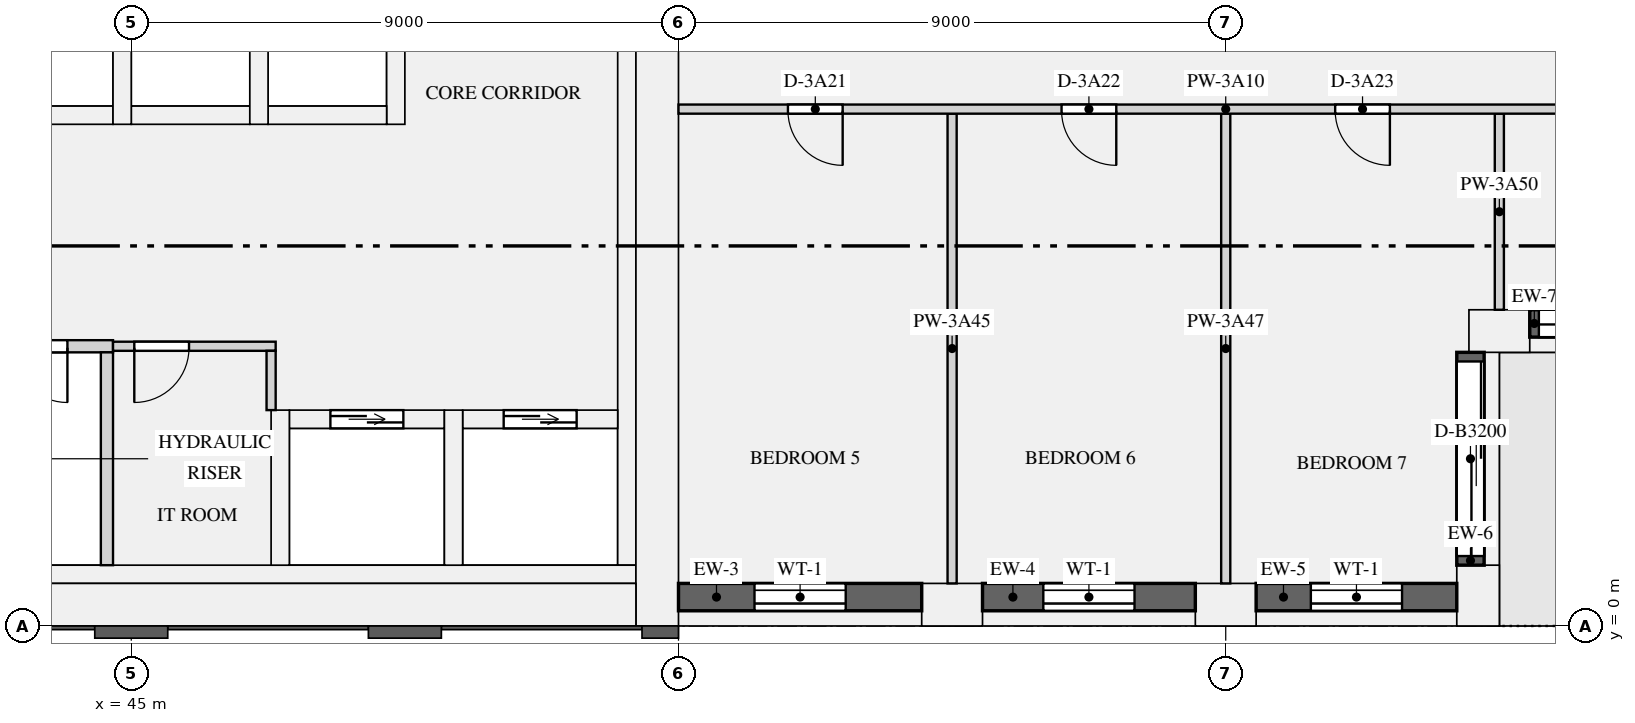
"""IFC4 building model, lengths in metres.
Left out: names, types, materials, properties, quantities, classifications, styles, units other than length and angle.
Written with IfcOpenShell. Run it as: python <this file> out.ifc"""

import sys

from ifc_helpers import new_model, si_unit, direction, frame, frame_2d, origin, origin_2d, place, context, subcontext, project, spatial, rectangle, extrude, element, fill, save


model = new_model("IFC4")
c1 = context("Model", 3, precision=1e-05, world=origin(), true_north=direction((0.0, 1.0)))
c2 = subcontext(c1, "Body", "Model", "MODEL_VIEW")
j1 = project(units=[si_unit("LENGTHUNIT", "METRE"), si_unit("PLANEANGLEUNIT", "RADIAN")], contexts=[c1])
p1 = place(None, origin())
s1 = spatial("IfcSite", under=j1, at=p1, CompositionType="ELEMENT")
p2 = place(p1, origin())
s2 = spatial("IfcBuilding", under=s1, at=p2, CompositionType="ELEMENT")
p3 = place(p2, frame((0.0, 0.0, 141.3)))
s3 = spatial("IfcBuildingStorey", under=s2, at=p3, CompositionType="ELEMENT", Elevation=141.3)
for number, where, z_axis, x_axis in (
    (1, (58.5, 0.35, 0.0), (0.0, 0.0, 1.0), (1.0, 0.0, 0.0)),
    (2, (63.0, 0.35, 0.0), (0.0, 0.0, 1.0), (1.0, 0.0, 0.0)),
    (3, (67.15, 0.5, 0.0), (0.0, 0.0, 1.0), (0.0, 1.0, 0.0)),
    (4, (67.5, 4.85, 0.0), (0.0, 0.0, 1.0), (1.0, 0.0, 0.0)),
):
    element("IfcColumn", number, at=place(p3, frame(where, z_axis=z_axis, x_axis=x_axis)), inside=s3, PredefinedType="USERDEFINED", context=c2, shape_type="SweptSolid", body=[
        extrude(rectangle(XDim=1.0, YDim=0.7, at=origin_2d()), origin(), (0.0, 0.0, 1.0), 3.15),
    ])
p4 = place(p3, frame((53.65, 0.0, 0.0), z_axis=(0.0, 0.0, 1.0), x_axis=(0.0, 1.0, 0.0)))
e5 = element("IfcWall", 5, at=p4, inside=s3, PredefinedType="SHEAR", context=c2, shape_type="SweptSolid", body=[
    extrude(rectangle(XDim=12.5, YDim=0.7, at=frame_2d((6.25, 0.0))), origin(), (0.0, 0.0, 1.0), 3.15),
])
p5 = place(p3, frame((18.7, 0.35, 0.0), z_axis=(0.0, 0.0, 1.0), x_axis=(1.0, 0.0, 0.0)))
e6 = element("IfcWall", 6, at=p5, inside=s3, PredefinedType="SHEAR", context=c2, shape_type="SweptSolid", body=[
    extrude(rectangle(XDim=34.6, YDim=0.7, at=frame_2d((17.3, 0.0))), origin(), (0.0, 0.0, 1.0), 3.15),
])
p6 = place(p3, frame((53.15, 1.0, 0.0), z_axis=(0.0, 0.0, 1.0), x_axis=(0.0, 1.0, 0.0)))
e7 = element("IfcWall", 7, at=p6, inside=s3, PredefinedType="SHEAR", context=c2, shape_type="SweptSolid", body=[
    extrude(rectangle(XDim=10.9, YDim=0.3, at=frame_2d((5.45, 0.0))), origin(), (0.0, 0.0, 1.0), 3.15),
])
p7 = place(p3, frame((18.7, 0.85, 0.0), z_axis=(0.0, 0.0, 1.0), x_axis=(1.0, 0.0, 0.0)))
e8 = element("IfcWall", 8, at=p7, inside=s3, PredefinedType="SHEAR", context=c2, shape_type="SweptSolid", body=[
    extrude(rectangle(XDim=34.6, YDim=0.3, at=frame_2d((17.3, 0.0))), origin(), (0.0, 0.0, 1.0), 3.15),
])
for number, where, z_axis, x_axis in (
    (9, (42.75, 8.4, 0.0), (0.0, 0.0, 1.0), (1.0, 0.0, 0.0)),
    (10, (45.0, 8.4, 0.0), (0.0, 0.0, 1.0), (1.0, 0.0, 0.0)),
):
    element("IfcWall", number, at=place(p3, frame(where, z_axis=z_axis, x_axis=x_axis)), inside=s3, PredefinedType="SHEAR", context=c2, shape_type="SweptSolid", body=[
        extrude(rectangle(XDim=1.95, YDim=0.3, at=frame_2d((0.975, 0.0))), origin(), (0.0, 0.0, 1.0), 3.15),
    ])
p8 = place(p3, frame((44.85, 8.25, 0.0), z_axis=(0.0, 0.0, 1.0), x_axis=(0.0, 1.0, 0.0)))
e11 = element("IfcWall", 11, at=p8, inside=s3, PredefinedType="SHEAR", context=c2, shape_type="SweptSolid", body=[
    extrude(rectangle(XDim=3.65, YDim=0.3, at=frame_2d((1.825, 0.0))), origin(), (0.0, 0.0, 1.0), 3.15),
])
p9 = place(p3, frame((47.25, 8.4, 0.0), z_axis=(0.0, 0.0, 1.0), x_axis=(1.0, 0.0, 0.0)))
e12 = element("IfcWall", 12, at=p9, inside=s3, PredefinedType="SHEAR", context=c2, shape_type="SweptSolid", body=[
    extrude(rectangle(XDim=1.95, YDim=0.3, at=frame_2d((0.975, 0.0))), origin(), (0.0, 0.0, 1.0), 3.15),
])
for number, where, z_axis, x_axis in (
    (13, (47.1, 8.25, 0.0), (0.0, 0.0, 1.0), (0.0, 1.0, 0.0)),
    (14, (49.35, 8.25, 0.0), (0.0, 0.0, 1.0), (0.0, 1.0, 0.0)),
):
    element("IfcWall", number, at=place(p3, frame(where, z_axis=z_axis, x_axis=x_axis)), inside=s3, PredefinedType="SHEAR", context=c2, shape_type="SweptSolid", body=[
        extrude(rectangle(XDim=3.65, YDim=0.3, at=frame_2d((1.825, 0.0))), origin(), (0.0, 0.0, 1.0), 3.15),
    ])
p10 = place(p3, frame((47.6, 3.4, 0.0), z_axis=(0.0, 0.0, 1.0), x_axis=(1.0, 0.0, 0.0)))
e15 = element("IfcWall", 15, at=p10, inside=s3, PredefinedType="SHEAR", context=c2, shape_type="SweptSolid", body=[
    extrude(rectangle(XDim=2.55, YDim=0.3, at=frame_2d((1.275, 0.0))), origin(), (0.0, 0.0, 1.0), 3.15),
])
p11 = place(p10, frame((0.675, 0.0, 0.0)))
e16 = element("IfcOpeningElement", 16, at=p11, cuts=e15, PredefinedType="OPENING", context=c2, shape_type="SweptSolid", body=[
    extrude(rectangle(XDim=1.2, YDim=2.1, at=frame_2d((0.6, 1.05))), frame((0.0, 0.16, 0.0), z_axis=(0.0, -1.0, 0.0), x_axis=(1.0, 0.0, 0.0)), (0.0, 0.0, 1.0), 0.32),
])
p12 = place(p3, frame((47.45, 1.0, 0.0), z_axis=(0.0, 0.0, 1.0), x_axis=(0.0, 1.0, 0.0)))
e17 = element("IfcWall", 17, at=p12, inside=s3, PredefinedType="SHEAR", context=c2, shape_type="SweptSolid", body=[
    extrude(rectangle(XDim=2.55, YDim=0.3, at=frame_2d((1.275, 0.0))), origin(), (0.0, 0.0, 1.0), 3.15),
])
p13 = place(p3, frame((50.45, 3.4, 0.0), z_axis=(0.0, 0.0, 1.0), x_axis=(1.0, 0.0, 0.0)))
e18 = element("IfcWall", 18, at=p13, inside=s3, PredefinedType="SHEAR", context=c2, shape_type="SweptSolid", body=[
    extrude(rectangle(XDim=2.55, YDim=0.3, at=frame_2d((1.275, 0.0))), origin(), (0.0, 0.0, 1.0), 3.15),
])
p14 = place(p13, frame((0.675, 0.0, 0.0)))
e19 = element("IfcOpeningElement", 19, at=p14, cuts=e18, PredefinedType="OPENING", context=c2, shape_type="SweptSolid", body=[
    extrude(rectangle(XDim=1.2, YDim=2.1, at=frame_2d((0.6, 1.05))), frame((0.0, 0.16, 0.0), z_axis=(0.0, -1.0, 0.0), x_axis=(1.0, 0.0, 0.0)), (0.0, 0.0, 1.0), 0.32),
])
p15 = place(p3, frame((50.3, 1.0, 0.0), z_axis=(0.0, 0.0, 1.0), x_axis=(0.0, 1.0, 0.0)))
e20 = element("IfcWall", 20, at=p15, inside=s3, PredefinedType="SHEAR", context=c2, shape_type="SweptSolid", body=[
    extrude(rectangle(XDim=2.55, YDim=0.3, at=frame_2d((1.275, 0.0))), origin(), (0.0, 0.0, 1.0), 3.15),
])
p16 = place(p3, frame((54.0, 0.475, 0.9), z_axis=(0.0, 0.0, 1.0), x_axis=(1.0, 0.0, 0.0)))
e21 = element("IfcWall", 21, at=p16, inside=s3, PredefinedType="SOLIDWALL", context=c2, shape_type="SweptSolid", body=[
    extrude(rectangle(XDim=4.0, YDim=0.45, at=frame_2d((2.0, 0.0))), origin(), (0.0, 0.0, 1.0), 1.93),
])
p17 = place(p16, frame((1.25, 0.0, 0.15)))
e22 = element("IfcOpeningElement", 22, at=p17, cuts=e21, PredefinedType="OPENING", context=c2, shape_type="SweptSolid", body=[
    extrude(rectangle(XDim=1.5, YDim=1.5, at=frame_2d((0.75, 0.75))), frame((0.0, 0.235, 0.0), z_axis=(0.0, -1.0, 0.0), x_axis=(1.0, 0.0, 0.0)), (0.0, 0.0, 1.0), 0.47),
])
p18 = place(p3, frame((59.0, 0.475, 0.9), z_axis=(0.0, 0.0, 1.0), x_axis=(1.0, 0.0, 0.0)))
e23 = element("IfcWall", 23, at=p18, inside=s3, PredefinedType="SOLIDWALL", context=c2, shape_type="SweptSolid", body=[
    extrude(rectangle(XDim=3.5, YDim=0.45, at=frame_2d((1.75, 0.0))), origin(), (0.0, 0.0, 1.0), 1.93),
])
p19 = place(p18, frame((1.0, 0.0, 0.15)))
e24 = element("IfcOpeningElement", 24, at=p19, cuts=e23, PredefinedType="OPENING", context=c2, shape_type="SweptSolid", body=[
    extrude(rectangle(XDim=1.5, YDim=1.5, at=frame_2d((0.75, 0.75))), frame((0.0, 0.235, 0.0), z_axis=(0.0, -1.0, 0.0), x_axis=(1.0, 0.0, 0.0)), (0.0, 0.0, 1.0), 0.47),
])
p20 = place(p3, frame((63.5, 0.475, 0.9), z_axis=(0.0, 0.0, 1.0), x_axis=(1.0, 0.0, 0.0)))
e25 = element("IfcWall", 25, at=p20, inside=s3, PredefinedType="SOLIDWALL", context=c2, shape_type="SweptSolid", body=[
    extrude(rectangle(XDim=3.3, YDim=0.45, at=frame_2d((1.65, 0.0))), origin(), (0.0, 0.0, 1.0), 1.93),
])
p21 = place(p20, frame((0.9, 0.0, 0.15)))
e26 = element("IfcOpeningElement", 26, at=p21, cuts=e25, PredefinedType="OPENING", context=c2, shape_type="SweptSolid", body=[
    extrude(rectangle(XDim=1.5, YDim=1.5, at=frame_2d((0.75, 0.75))), frame((0.0, 0.235, 0.0), z_axis=(0.0, -1.0, 0.0), x_axis=(1.0, 0.0, 0.0)), (0.0, 0.0, 1.0), 0.47),
])
p22 = place(p3, frame((67.025, 1.0, 0.0), z_axis=(0.0, 0.0, 1.0), x_axis=(0.0, 1.0, 0.0)))
e27 = element("IfcWall", 27, at=p22, inside=s3, PredefinedType="SOLIDWALL", context=c2, shape_type="SweptSolid", body=[
    extrude(rectangle(XDim=3.5, YDim=0.45, at=frame_2d((1.75, 0.0))), origin(), (0.0, 0.0, 1.0), 2.83),
])
p23 = place(p22, frame((0.15, 0.0, 0.0)))
e28 = element("IfcOpeningElement", 28, at=p23, cuts=e27, PredefinedType="OPENING", context=c2, shape_type="SweptSolid", body=[
    extrude(rectangle(XDim=3.2, YDim=2.3, at=frame_2d((1.6, 1.15))), frame((0.0, 0.235, 0.0), z_axis=(0.0, -1.0, 0.0), x_axis=(1.0, 0.0, 0.0)), (0.0, 0.0, 1.0), 0.47),
])
p24 = place(p3, frame((68.0, 4.975, 0.0), z_axis=(0.0, 0.0, 1.0), x_axis=(1.0, 0.0, 0.0)))
e29 = element("IfcWall", 29, at=p24, inside=s3, PredefinedType="SOLIDWALL", context=c2, shape_type="SweptSolid", body=[
    extrude(rectangle(XDim=3.3, YDim=0.45, at=frame_2d((1.65, 0.0))), origin(), (0.0, 0.0, 1.0), 2.83),
])
p25 = place(p24, frame((0.15, 0.0, 0.0)))
e30 = element("IfcOpeningElement", 30, at=p25, cuts=e29, PredefinedType="OPENING", context=c2, shape_type="SweptSolid", body=[
    extrude(rectangle(XDim=3.0, YDim=2.3, at=frame_2d((1.5, 1.15))), frame((0.0, 0.235, 0.0), z_axis=(0.0, -1.0, 0.0), x_axis=(1.0, 0.0, 0.0)), (0.0, 0.0, 1.0), 0.47),
])
p26 = place(p3, frame((40.2, 4.6, 0.0), z_axis=(0.0, 0.0, 1.0), x_axis=(1.0, 0.0, 0.0)))
e31 = element("IfcWall", 31, at=p26, inside=s3, PredefinedType="PARTITIONING", context=c2, shape_type="SweptSolid", body=[
    extrude(rectangle(XDim=4.5, YDim=0.2, at=frame_2d((2.25, 0.0))), origin(), (0.0, 0.0, 1.0), 2.83),
])
p27 = place(p26, frame((0.65, 0.0, 0.0)))
e32 = element("IfcOpeningElement", 32, at=p27, cuts=e31, PredefinedType="OPENING", context=c2, shape_type="SweptSolid", body=[
    extrude(rectangle(XDim=0.9, YDim=2.1, at=frame_2d((0.45, 1.05))), frame((0.0, 0.11, 0.0), z_axis=(0.0, -1.0, 0.0), x_axis=(1.0, 0.0, 0.0)), (0.0, 0.0, 1.0), 0.22),
])
p28 = place(p26, frame((2.85, 0.0, 0.0)))
e33 = element("IfcOpeningElement", 33, at=p28, cuts=e31, PredefinedType="OPENING", context=c2, shape_type="SweptSolid", body=[
    extrude(rectangle(XDim=0.9, YDim=2.1, at=frame_2d((0.45, 1.05))), frame((0.0, 0.11, 0.0), z_axis=(0.0, -1.0, 0.0), x_axis=(1.0, 0.0, 0.0)), (0.0, 0.0, 1.0), 0.22),
])
p29 = place(p3, frame((44.7, 4.6, 0.0), z_axis=(0.0, 0.0, 1.0), x_axis=(1.0, 0.0, 0.0)))
e34 = element("IfcWall", 34, at=p29, inside=s3, PredefinedType="PARTITIONING", context=c2, shape_type="SweptSolid", body=[
    extrude(rectangle(XDim=2.675, YDim=0.15, at=frame_2d((1.337, 0.0))), origin(), (0.0, 0.0, 1.0), 2.83),
])
p30 = place(p29, frame((0.35, 0.0, 0.0)))
e35 = element("IfcOpeningElement", 35, at=p30, cuts=e34, PredefinedType="OPENING", context=c2, shape_type="SweptSolid", body=[
    extrude(rectangle(XDim=0.9, YDim=2.1, at=frame_2d((0.45, 1.05))), frame((0.0, 0.085, 0.0), z_axis=(0.0, -1.0, 0.0), x_axis=(1.0, 0.0, 0.0)), (0.0, 0.0, 1.0), 0.17),
])
p31 = place(p3, frame((44.6, 1.0, 0.0), z_axis=(0.0, 0.0, 1.0), x_axis=(0.0, 1.0, 0.0)))
e36 = element("IfcWall", 36, at=p31, inside=s3, PredefinedType="PARTITIONING", context=c2, shape_type="SweptSolid", body=[
    extrude(rectangle(XDim=3.5, YDim=0.2, at=frame_2d((1.75, 0.0))), origin(), (0.0, 0.0, 1.0), 2.83),
])
p32 = place(p3, frame((47.3, 3.55, 0.0), z_axis=(0.0, 0.0, 1.0), x_axis=(0.0, 1.0, 0.0)))
e37 = element("IfcWall", 37, at=p32, inside=s3, PredefinedType="PARTITIONING", context=c2, shape_type="SweptSolid", body=[
    extrude(rectangle(XDim=0.975, YDim=0.15, at=frame_2d((0.487, 0.0))), origin(), (0.0, 0.0, 1.0), 2.83),
])
p33 = place(p3, frame((54.0, 8.5, 0.0), z_axis=(0.0, 0.0, 1.0), x_axis=(1.0, 0.0, 0.0)))
e38 = element("IfcWall", 38, at=p33, inside=s3, PredefinedType="PARTITIONING", context=c2, shape_type="SweptSolid", body=[
    extrude(rectangle(XDim=17.3, YDim=0.15, at=frame_2d((8.65, 0.0))), origin(), (0.0, 0.0, 1.0), 2.83),
])
p34 = place(p33, frame((1.8, 0.0, 0.0)))
e39 = element("IfcOpeningElement", 39, at=p34, cuts=e38, PredefinedType="OPENING", context=c2, shape_type="SweptSolid", body=[
    extrude(rectangle(XDim=0.9, YDim=2.1, at=frame_2d((0.45, 1.05))), frame((0.0, 0.085, 0.0), z_axis=(0.0, -1.0, 0.0), x_axis=(1.0, 0.0, 0.0)), (0.0, 0.0, 1.0), 0.17),
])
p35 = place(p33, frame((6.3, 0.0, 0.0)))
e40 = element("IfcOpeningElement", 40, at=p35, cuts=e38, PredefinedType="OPENING", context=c2, shape_type="SweptSolid", body=[
    extrude(rectangle(XDim=0.9, YDim=2.1, at=frame_2d((0.45, 1.05))), frame((0.0, 0.085, 0.0), z_axis=(0.0, -1.0, 0.0), x_axis=(1.0, 0.0, 0.0)), (0.0, 0.0, 1.0), 0.17),
])
p36 = place(p33, frame((10.8, 0.0, 0.0)))
e41 = element("IfcOpeningElement", 41, at=p36, cuts=e38, PredefinedType="OPENING", context=c2, shape_type="SweptSolid", body=[
    extrude(rectangle(XDim=0.9, YDim=2.1, at=frame_2d((0.45, 1.05))), frame((0.0, 0.085, 0.0), z_axis=(0.0, -1.0, 0.0), x_axis=(1.0, 0.0, 0.0)), (0.0, 0.0, 1.0), 0.17),
])
p37 = place(p33, frame((15.025, 0.0, 0.0)))
e42 = element("IfcOpeningElement", 42, at=p37, cuts=e38, PredefinedType="OPENING", context=c2, shape_type="SweptSolid", body=[
    extrude(rectangle(XDim=0.9, YDim=2.1, at=frame_2d((0.45, 1.05))), frame((0.0, 0.085, 0.0), z_axis=(0.0, -1.0, 0.0), x_axis=(1.0, 0.0, 0.0)), (0.0, 0.0, 1.0), 0.17),
])
for number, where, z_axis, x_axis in (
    (43, (58.5, 0.7, 0.0), (0.0, 0.0, 1.0), (0.0, 1.0, 0.0)),
    (44, (63.0, 0.7, 0.0), (0.0, 0.0, 1.0), (0.0, 1.0, 0.0)),
):
    element("IfcWall", number, at=place(p3, frame(where, z_axis=z_axis, x_axis=x_axis)), inside=s3, PredefinedType="PARTITIONING", context=c2, shape_type="SweptSolid", body=[
        extrude(rectangle(XDim=7.725, YDim=0.15, at=frame_2d((3.863, 0.0))), origin(), (0.0, 0.0, 1.0), 2.83),
    ])
p38 = place(p3, frame((67.5, 5.2, 0.0), z_axis=(0.0, 0.0, 1.0), x_axis=(0.0, 1.0, 0.0)))
e45 = element("IfcWall", 45, at=p38, inside=s3, PredefinedType="PARTITIONING", context=c2, shape_type="SweptSolid", body=[
    extrude(rectangle(XDim=3.225, YDim=0.15, at=frame_2d((1.613, 0.0))), origin(), (0.0, 0.0, 1.0), 2.83),
])
p39 = place(p17, origin())
e46 = element("IfcWindow", 46, at=p39, inside=s3, PartitioningType="SINGLE_PANEL", PredefinedType="WINDOW", context=c2, shape_type="SweptSolid", body=[
    extrude(rectangle(XDim=1.5, YDim=1.5, at=frame_2d((0.75, 0.75))), frame((0.0, -0.065, 0.0), z_axis=(0.0, -1.0, 0.0), x_axis=(1.0, 0.0, 0.0)), (0.0, 0.0, 1.0), 0.06),
])
fill(e22, e46)
p40 = place(p19, origin())
e47 = element("IfcWindow", 47, at=p40, inside=s3, PartitioningType="SINGLE_PANEL", PredefinedType="WINDOW", context=c2, shape_type="SweptSolid", body=[
    extrude(rectangle(XDim=1.5, YDim=1.5, at=frame_2d((0.75, 0.75))), frame((0.0, -0.065, 0.0), z_axis=(0.0, -1.0, 0.0), x_axis=(1.0, 0.0, 0.0)), (0.0, 0.0, 1.0), 0.06),
])
fill(e24, e47)
p41 = place(p21, origin())
e48 = element("IfcWindow", 48, at=p41, inside=s3, PartitioningType="SINGLE_PANEL", PredefinedType="WINDOW", context=c2, shape_type="SweptSolid", body=[
    extrude(rectangle(XDim=1.5, YDim=1.5, at=frame_2d((0.75, 0.75))), frame((0.0, -0.065, 0.0), z_axis=(0.0, -1.0, 0.0), x_axis=(1.0, 0.0, 0.0)), (0.0, 0.0, 1.0), 0.06),
])
fill(e26, e48)
p42 = place(p23, origin())
e49 = element("IfcDoor", 49, at=p42, inside=s3, OperationType="SLIDING_TO_LEFT", PredefinedType="DOOR", context=c2, shape_type="SweptSolid", body=[
    extrude(rectangle(XDim=3.2, YDim=2.3, at=frame_2d((1.6, 1.15))), frame((0.0, -0.07, 0.0), z_axis=(0.0, -1.0, 0.0), x_axis=(1.0, 0.0, 0.0)), (0.0, 0.0, 1.0), 0.05),
])
fill(e28, e49)
p43 = place(p25, origin())
e50 = element("IfcDoor", 50, at=p43, inside=s3, OperationType="SLIDING_TO_LEFT", PredefinedType="DOOR", context=c2, shape_type="SweptSolid", body=[
    extrude(rectangle(XDim=3.0, YDim=2.3, at=frame_2d((1.5, 1.15))), frame((0.0, -0.07, 0.0), z_axis=(0.0, -1.0, 0.0), x_axis=(1.0, 0.0, 0.0)), (0.0, 0.0, 1.0), 0.05),
])
fill(e30, e50)
p44 = place(p11, origin())
e51 = element("IfcDoor", 51, at=p44, inside=s3, OperationType="DOUBLE_DOOR_SLIDING", PredefinedType="DOOR", context=c2, shape_type="SweptSolid", body=[
    extrude(rectangle(XDim=1.2, YDim=2.1, at=frame_2d((0.6, 1.05))), frame((0.0, 0.025, 0.0), z_axis=(0.0, -1.0, 0.0), x_axis=(1.0, 0.0, 0.0)), (0.0, 0.0, 1.0), 0.05),
])
fill(e16, e51)
p45 = place(p14, origin())
e52 = element("IfcDoor", 52, at=p45, inside=s3, OperationType="DOUBLE_DOOR_SLIDING", PredefinedType="DOOR", context=c2, shape_type="SweptSolid", body=[
    extrude(rectangle(XDim=1.2, YDim=2.1, at=frame_2d((0.6, 1.05))), frame((0.0, 0.025, 0.0), z_axis=(0.0, -1.0, 0.0), x_axis=(1.0, 0.0, 0.0)), (0.0, 0.0, 1.0), 0.05),
])
fill(e19, e52)
p46 = place(p30, frame((0.9, 0.0, 0.0), z_axis=(0.0, 0.0, 1.0), x_axis=(-1.0, 0.0, 0.0)))
e53 = element("IfcDoor", 53, at=p46, inside=s3, OperationType="SINGLE_SWING_RIGHT", PredefinedType="DOOR", context=c2, shape_type="SweptSolid", body=[
    extrude(rectangle(XDim=0.9, YDim=2.1, at=frame_2d((0.45, 1.05))), frame((0.0, 0.025, 0.0), z_axis=(0.0, -1.0, 0.0), x_axis=(1.0, 0.0, 0.0)), (0.0, 0.0, 1.0), 0.05),
])
fill(e35, e53)
p47 = place(p28, frame((0.9, 0.0, 0.0), z_axis=(0.0, 0.0, 1.0), x_axis=(-1.0, 0.0, 0.0)))
e54 = element("IfcDoor", 54, at=p47, inside=s3, OperationType="SINGLE_SWING_LEFT", PredefinedType="DOOR", context=c2, shape_type="SweptSolid", body=[
    extrude(rectangle(XDim=0.9, YDim=2.1, at=frame_2d((0.45, 1.05))), frame((0.0, 0.025, 0.0), z_axis=(0.0, -1.0, 0.0), x_axis=(1.0, 0.0, 0.0)), (0.0, 0.0, 1.0), 0.05),
])
fill(e33, e54)
p48 = place(p34, frame((0.9, 0.0, 0.0), z_axis=(0.0, 0.0, 1.0), x_axis=(-1.0, 0.0, 0.0)))
e55 = element("IfcDoor", 55, at=p48, inside=s3, OperationType="SINGLE_SWING_LEFT", PredefinedType="DOOR", context=c2, shape_type="SweptSolid", body=[
    extrude(rectangle(XDim=0.9, YDim=2.1, at=frame_2d((0.45, 1.05))), frame((0.0, 0.025, 0.0), z_axis=(0.0, -1.0, 0.0), x_axis=(1.0, 0.0, 0.0)), (0.0, 0.0, 1.0), 0.05),
])
fill(e39, e55)
p49 = place(p35, frame((0.9, 0.0, 0.0), z_axis=(0.0, 0.0, 1.0), x_axis=(-1.0, 0.0, 0.0)))
e56 = element("IfcDoor", 56, at=p49, inside=s3, OperationType="SINGLE_SWING_LEFT", PredefinedType="DOOR", context=c2, shape_type="SweptSolid", body=[
    extrude(rectangle(XDim=0.9, YDim=2.1, at=frame_2d((0.45, 1.05))), frame((0.0, 0.025, 0.0), z_axis=(0.0, -1.0, 0.0), x_axis=(1.0, 0.0, 0.0)), (0.0, 0.0, 1.0), 0.05),
])
fill(e40, e56)
p50 = place(p36, frame((0.9, 0.0, 0.0), z_axis=(0.0, 0.0, 1.0), x_axis=(-1.0, 0.0, 0.0)))
e57 = element("IfcDoor", 57, at=p50, inside=s3, OperationType="SINGLE_SWING_LEFT", PredefinedType="DOOR", context=c2, shape_type="SweptSolid", body=[
    extrude(rectangle(XDim=0.9, YDim=2.1, at=frame_2d((0.45, 1.05))), frame((0.0, 0.025, 0.0), z_axis=(0.0, -1.0, 0.0), x_axis=(1.0, 0.0, 0.0)), (0.0, 0.0, 1.0), 0.05),
])
fill(e41, e57)
save(model, sys.argv[1])
